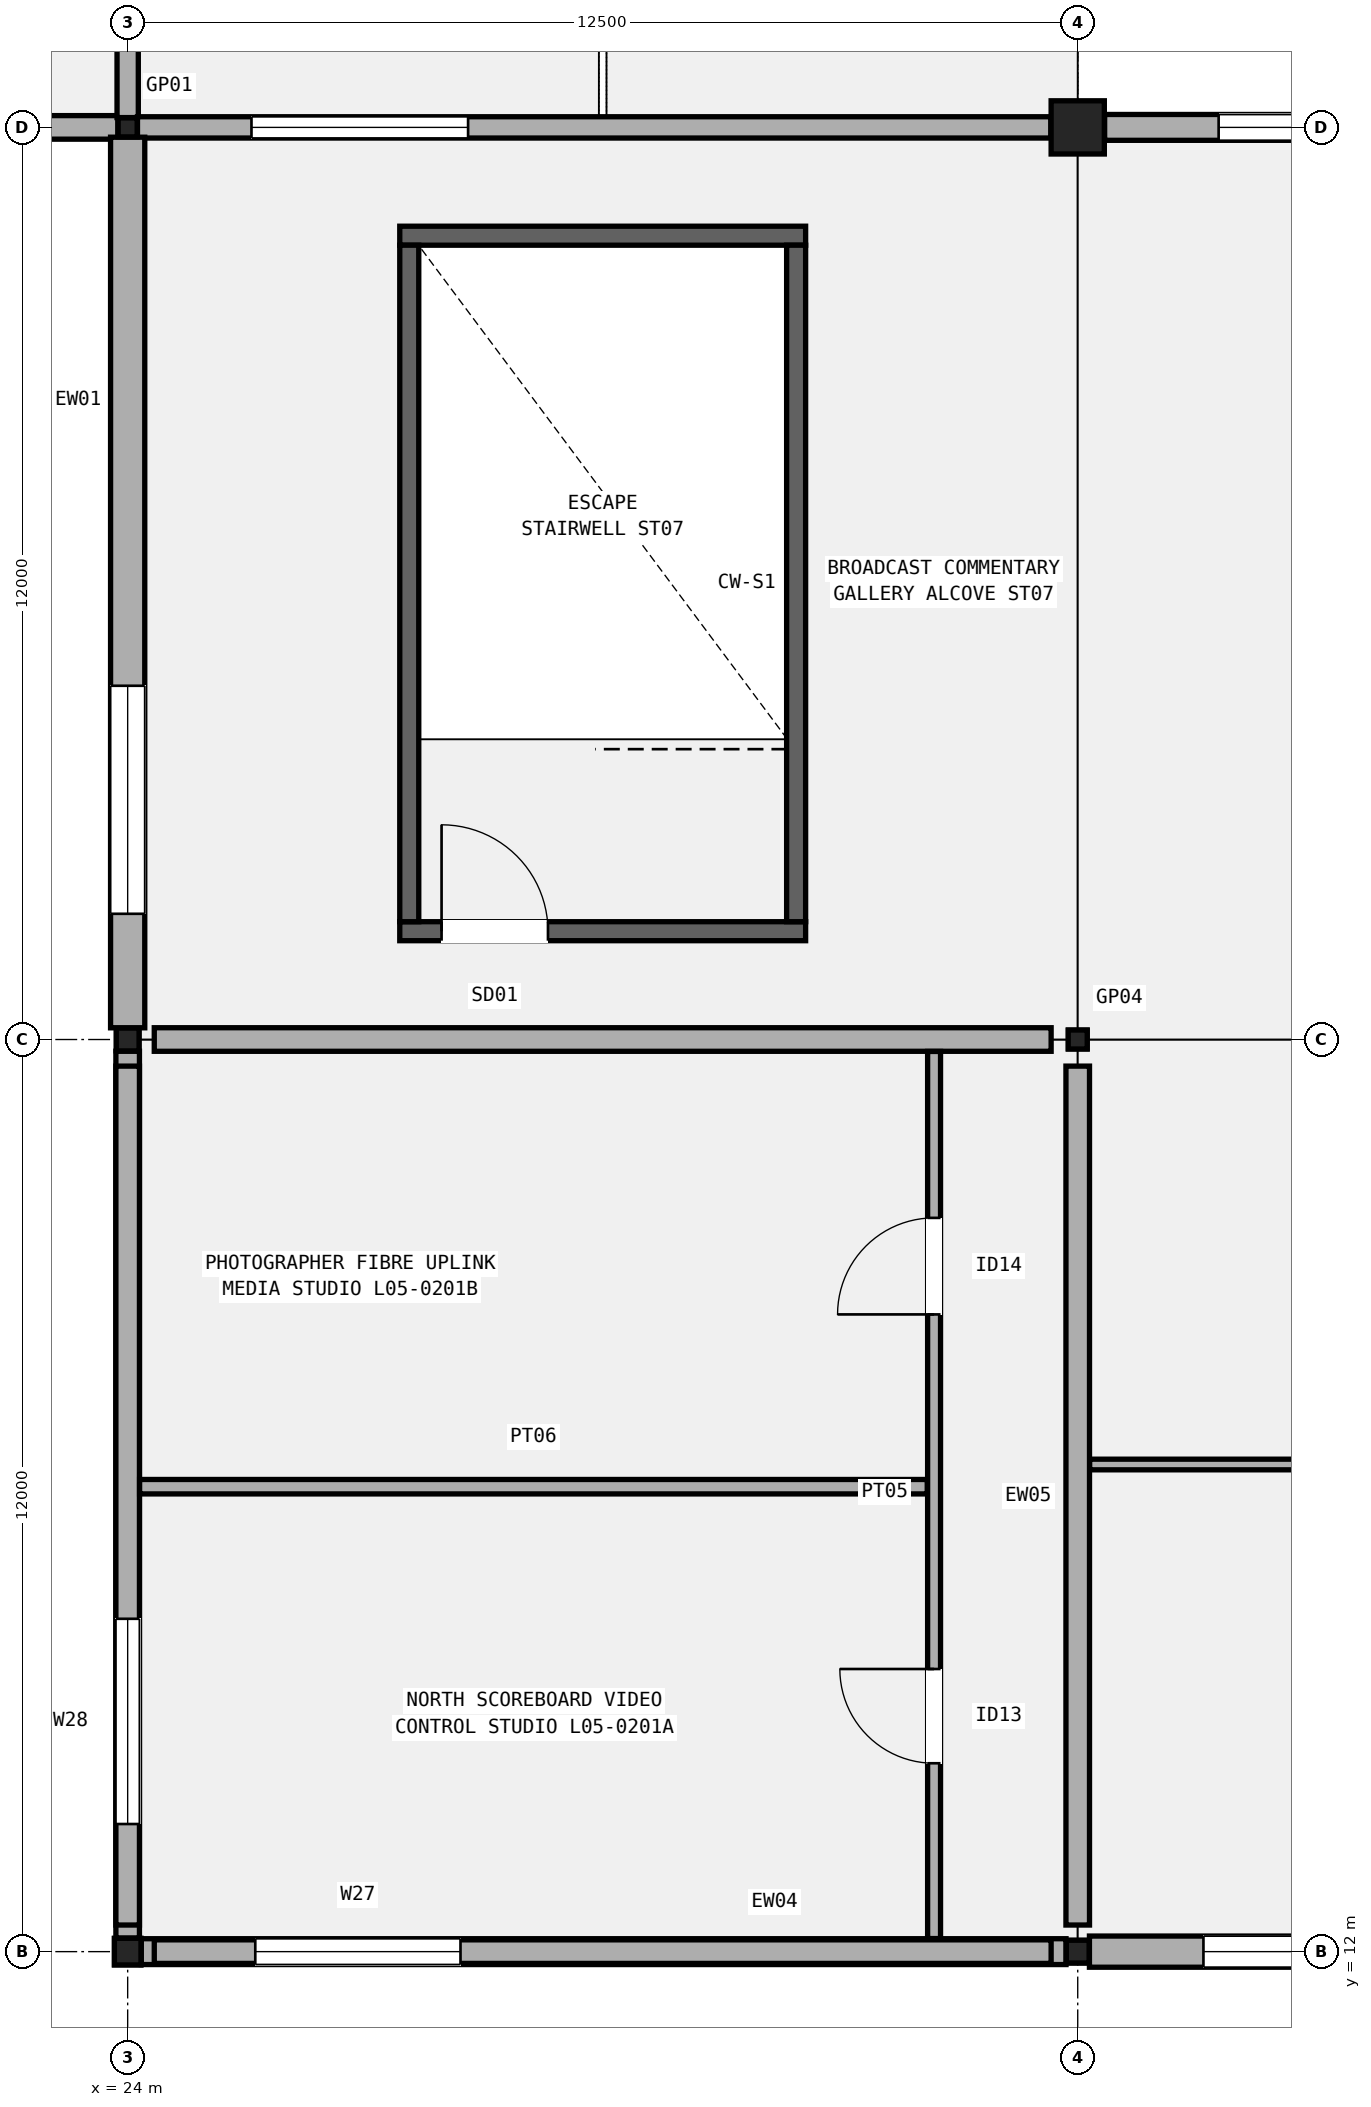
"""IFC4 building model, lengths in metres.
Left out: names, types, materials, properties, quantities, classifications, styles, units other than length and angle.
Written with IfcOpenShell. Run it as: python <this file> out.ifc"""

import sys

from ifc_helpers import new_model, si_unit, direction, frame, frame_2d, origin, origin_2d, place, context, subcontext, project, spatial, rectangle, hollow_rectangle, extrude, element, fill, save


model = new_model("IFC4")
c1 = context("Model", 3, precision=1e-05, world=origin(), true_north=direction((0.0, 1.0)))
c2 = subcontext(c1, "Body", "Model", "MODEL_VIEW")
j1 = project(units=[si_unit("LENGTHUNIT", "METRE"), si_unit("PLANEANGLEUNIT", "RADIAN")], contexts=[c1])
p1 = place(None, origin())
s1 = spatial("IfcSite", under=j1, at=p1, CompositionType="ELEMENT")
p2 = place(p1, origin())
s2 = spatial("IfcBuilding", under=s1, at=p2, CompositionType="ELEMENT")
p3 = place(p2, frame((0.0, 0.0, 25.8)))
s3 = spatial("IfcBuildingStorey", under=s2, at=p3, CompositionType="ELEMENT", Elevation=25.8)
p4 = place(p3, frame((24.0, 12.0, 0.0), z_axis=(0.0, 0.0, 1.0), x_axis=(1.0, 0.0, 0.0)))
e1 = element("IfcColumn", 1, at=p4, inside=s3, PredefinedType="COLUMN", context=c2, shape_type="SweptSolid", body=[
    extrude(hollow_rectangle(XDim=0.35, YDim=0.35, WallThickness=0.016, InnerFilletRadius=0.016, OuterFilletRadius=0.032, at=origin_2d()), origin(), (0.0, 0.0, 1.0), 5.4),
])
p5 = place(p3, frame((24.0, 24.0, 0.0), z_axis=(0.0, 0.0, 1.0), x_axis=(1.0, 0.0, 0.0)))
e2 = element("IfcColumn", 2, at=p5, inside=s3, PredefinedType="COLUMN", context=c2, shape_type="SweptSolid", body=[
    extrude(hollow_rectangle(XDim=0.3, YDim=0.3, WallThickness=0.012, InnerFilletRadius=0.012, OuterFilletRadius=0.024, at=origin_2d()), origin(), (0.0, 0.0, 1.0), 5.4),
])
p6 = place(p3, frame((24.0, 36.0, 0.0), z_axis=(0.0, 0.0, 1.0), x_axis=(1.0, 0.0, 0.0)))
e3 = element("IfcColumn", 3, at=p6, inside=s3, PredefinedType="COLUMN", context=c2, shape_type="SweptSolid", body=[
    extrude(hollow_rectangle(XDim=0.25, YDim=0.25, WallThickness=0.012, InnerFilletRadius=0.012, OuterFilletRadius=0.024, at=origin_2d()), origin(), (0.0, 0.0, 1.0), 5.4),
])
p7 = place(p3, frame((36.5, 12.0, 0.0), z_axis=(0.0, 0.0, 1.0), x_axis=(1.0, 0.0, 0.0)))
e4 = element("IfcColumn", 4, at=p7, inside=s3, PredefinedType="COLUMN", context=c2, shape_type="SweptSolid", body=[
    extrude(hollow_rectangle(XDim=0.3, YDim=0.3, WallThickness=0.012, InnerFilletRadius=0.012, OuterFilletRadius=0.024, at=origin_2d()), origin(), (0.0, 0.0, 1.0), 5.4),
])
p8 = place(p3, frame((36.5, 24.0, 0.0), z_axis=(0.0, 0.0, 1.0), x_axis=(1.0, 0.0, 0.0)))
e5 = element("IfcColumn", 5, at=p8, inside=s3, PredefinedType="COLUMN", context=c2, shape_type="SweptSolid", body=[
    extrude(hollow_rectangle(XDim=0.25, YDim=0.25, WallThickness=0.012, InnerFilletRadius=0.012, OuterFilletRadius=0.024, at=origin_2d()), origin(), (0.0, 0.0, 1.0), 5.4),
])
p9 = place(p3, frame((36.5, 36.0, 0.0), z_axis=(0.0, 0.0, 1.0), x_axis=(1.0, 0.0, 0.0)))
e6 = element("IfcColumn", 6, at=p9, inside=s3, PredefinedType="COLUMN", context=c2, shape_type="SweptSolid", body=[
    extrude(rectangle(XDim=0.7, YDim=0.7, at=origin_2d()), origin(), (0.0, 0.0, 1.0), 5.4),
])
p10 = place(p3, frame((12.154, 36.0, 0.0), z_axis=(0.0, 0.0, 1.0), x_axis=(1.0, 0.0, 0.0)))
e7 = element("IfcWall", 7, at=p10, inside=s3, PredefinedType="SOLIDWALL", context=c2, shape_type="SweptSolid", body=[
    extrude(rectangle(XDim=11.717, YDim=0.31, at=frame_2d((5.858, 0.0))), origin(), (0.0, 0.0, 1.0), 4.44),
])
p11 = place(p10, frame((1.5, 0.0, 0.95)))
e8 = element("IfcOpeningElement", 8, at=p11, cuts=e7, PredefinedType="OPENING", context=c2, shape_type="SweptSolid", body=[
    extrude(rectangle(XDim=1.5, YDim=2.25, at=frame_2d((0.75, 1.125))), frame((0.0, 0.165, 0.0), z_axis=(0.0, -1.0, 0.0), x_axis=(1.0, 0.0, 0.0)), (0.0, 0.0, 1.0), 0.33),
])
p12 = place(p3, frame((24.0, 36.129, 0.0), z_axis=(0.0, 0.0, 1.0), x_axis=(0.0, 1.0, 0.0)))
e9 = element("IfcWall", 9, at=p12, inside=s3, PredefinedType="SOLIDWALL", context=c2, shape_type="SweptSolid", body=[
    extrude(rectangle(XDim=11.517, YDim=0.28, at=frame_2d((5.759, 0.0))), origin(), (0.0, 0.0, 1.0), 4.13),
])
p13 = place(p12, frame((1.5, 0.0, 0.95)))
e10 = element("IfcOpeningElement", 10, at=p13, cuts=e9, PredefinedType="OPENING", context=c2, shape_type="SweptSolid", body=[
    extrude(rectangle(XDim=1.65, YDim=2.05, at=frame_2d((0.825, 1.025))), frame((0.0, 0.15, 0.0), z_axis=(0.0, -1.0, 0.0), x_axis=(1.0, 0.0, 0.0)), (0.0, 0.0, 1.0), 0.3),
])
p14 = place(p3, frame((24.179, 12.0, 0.0), z_axis=(0.0, 0.0, 1.0), x_axis=(1.0, 0.0, 0.0)))
e11 = element("IfcWall", 11, at=p14, inside=s3, PredefinedType="SOLIDWALL", context=c2, shape_type="SweptSolid", body=[
    extrude(rectangle(XDim=12.167, YDim=0.34, at=frame_2d((6.083, 0.0))), origin(), (0.0, 0.0, 1.0), 4.34),
])
p15 = place(p14, frame((1.5, 0.0, 0.95)))
e12 = element("IfcOpeningElement", 12, at=p15, cuts=e11, PredefinedType="OPENING", context=c2, shape_type="SweptSolid", body=[
    extrude(rectangle(XDim=2.7, YDim=1.75, at=frame_2d((1.35, 0.875))), frame((0.0, 0.18, 0.0), z_axis=(0.0, -1.0, 0.0), x_axis=(1.0, 0.0, 0.0)), (0.0, 0.0, 1.0), 0.36),
])
p16 = place(p3, frame((24.0, 12.179, 0.0), z_axis=(0.0, 0.0, 1.0), x_axis=(0.0, 1.0, 0.0)))
e13 = element("IfcWall", 13, at=p16, inside=s3, PredefinedType="SOLIDWALL", context=c2, shape_type="SweptSolid", body=[
    extrude(rectangle(XDim=11.667, YDim=0.31, at=frame_2d((5.833, 0.0))), origin(), (0.0, 0.0, 1.0), 4.34),
])
p17 = place(p16, frame((1.5, 0.0, 0.95)))
e14 = element("IfcOpeningElement", 14, at=p17, cuts=e13, PredefinedType="OPENING", context=c2, shape_type="SweptSolid", body=[
    extrude(rectangle(XDim=2.7, YDim=2.2, at=frame_2d((1.35, 1.1))), frame((0.0, 0.165, 0.0), z_axis=(0.0, -1.0, 0.0), x_axis=(1.0, 0.0, 0.0)), (0.0, 0.0, 1.0), 0.33),
])
p18 = place(p3, frame((24.129, 36.0, 0.0), z_axis=(0.0, 0.0, 1.0), x_axis=(1.0, 0.0, 0.0)))
e15 = element("IfcWall", 15, at=p18, inside=s3, PredefinedType="SOLIDWALL", context=c2, shape_type="SweptSolid", body=[
    extrude(rectangle(XDim=12.017, YDim=0.28, at=frame_2d((6.009, 0.0))), origin(), (0.0, 0.0, 1.0), 4.452),
])
p19 = place(p18, frame((1.5, 0.0, 0.95)))
e16 = element("IfcOpeningElement", 16, at=p19, cuts=e15, PredefinedType="OPENING", context=c2, shape_type="SweptSolid", body=[
    extrude(rectangle(XDim=2.85, YDim=2.0, at=frame_2d((1.425, 1.0))), frame((0.0, 0.15, 0.0), z_axis=(0.0, -1.0, 0.0), x_axis=(1.0, 0.0, 0.0)), (0.0, 0.0, 1.0), 0.3),
])
p20 = place(p3, frame((24.0, 24.154, 0.0), z_axis=(0.0, 0.0, 1.0), x_axis=(0.0, 1.0, 0.0)))
e17 = element("IfcWall", 17, at=p20, inside=s3, PredefinedType="SOLIDWALL", context=c2, shape_type="SweptSolid", body=[
    extrude(rectangle(XDim=11.717, YDim=0.45, at=frame_2d((5.858, 0.0))), origin(), (0.0, 0.0, 1.0), 4.44),
])
p21 = place(p20, frame((1.5, 0.0, 0.95)))
e18 = element("IfcOpeningElement", 18, at=p21, cuts=e17, PredefinedType="OPENING", context=c2, shape_type="SweptSolid", body=[
    extrude(rectangle(XDim=3.0, YDim=1.7, at=frame_2d((1.5, 0.85))), frame((0.0, 0.235, 0.0), z_axis=(0.0, -1.0, 0.0), x_axis=(1.0, 0.0, 0.0)), (0.0, 0.0, 1.0), 0.47),
])
p22 = place(p3, frame((36.654, 12.0, 0.0), z_axis=(0.0, 0.0, 1.0), x_axis=(1.0, 0.0, 0.0)))
e19 = element("IfcWall", 19, at=p22, inside=s3, PredefinedType="SOLIDWALL", context=c2, shape_type="SweptSolid", body=[
    extrude(rectangle(XDim=12.217, YDim=0.41, at=frame_2d((6.108, 0.0))), origin(), (0.0, 0.0, 1.0), 4.44),
])
p23 = place(p22, frame((1.5, 0.0, 0.95)))
e20 = element("IfcOpeningElement", 20, at=p23, cuts=e19, PredefinedType="OPENING", context=c2, shape_type="SweptSolid", body=[
    extrude(rectangle(XDim=3.0, YDim=2.15, at=frame_2d((1.5, 1.075))), frame((0.0, 0.215, 0.0), z_axis=(0.0, -1.0, 0.0), x_axis=(1.0, 0.0, 0.0)), (0.0, 0.0, 1.0), 0.43),
])
p24 = place(p3, frame((36.854, 36.0, 0.0), z_axis=(0.0, 0.0, 1.0), x_axis=(1.0, 0.0, 0.0)))
e21 = element("IfcWall", 21, at=p24, inside=s3, PredefinedType="SOLIDWALL", context=c2, shape_type="SweptSolid", body=[
    extrude(rectangle(XDim=11.842, YDim=0.34, at=frame_2d((5.921, 0.0))), origin(), (0.0, 0.0, 1.0), 4.13),
])
p25 = place(p24, frame((1.5, 0.0, 0.95)))
e22 = element("IfcOpeningElement", 22, at=p25, cuts=e21, PredefinedType="OPENING", context=c2, shape_type="SweptSolid", body=[
    extrude(rectangle(XDim=3.3, YDim=1.8, at=frame_2d((1.65, 0.9))), frame((0.0, 0.18, 0.0), z_axis=(0.0, -1.0, 0.0), x_axis=(1.0, 0.0, 0.0)), (0.0, 0.0, 1.0), 0.36),
])
p26 = place(p3, frame((24.35, 12.0, 5.4), z_axis=(0.0, 0.0, 1.0), x_axis=(1.0, 0.0, 0.0)))
e23 = element("IfcWall", 23, at=p26, inside=s3, PredefinedType="SOLIDWALL", context=c2, shape_type="SweptSolid", body=[
    extrude(rectangle(XDim=11.8, YDim=0.31, at=frame_2d((5.9, 0.0))), origin(), (0.0, 0.0, 1.0), 1.38),
])
p27 = place(p3, frame((24.35, 24.0, 5.4), z_axis=(0.0, 0.0, 1.0), x_axis=(1.0, 0.0, 0.0)))
e24 = element("IfcWall", 24, at=p27, inside=s3, PredefinedType="SOLIDWALL", context=c2, shape_type="SweptSolid", body=[
    extrude(rectangle(XDim=11.8, YDim=0.31, at=frame_2d((5.9, 0.0))), origin(), (0.0, 0.0, 1.0), 0.58),
])
p28 = place(p3, frame((24.0, 12.35, 5.4), z_axis=(0.0, 0.0, 1.0), x_axis=(0.0, 1.0, 0.0)))
e25 = element("IfcWall", 25, at=p28, inside=s3, PredefinedType="SOLIDWALL", context=c2, shape_type="SweptSolid", body=[
    extrude(rectangle(XDim=11.3, YDim=0.31, at=frame_2d((5.65, 0.0))), origin(), (0.0, 0.0, 1.0), 1.38),
])
p29 = place(p3, frame((36.5, 12.35, 5.4), z_axis=(0.0, 0.0, 1.0), x_axis=(0.0, 1.0, 0.0)))
e26 = element("IfcWall", 26, at=p29, inside=s3, PredefinedType="SOLIDWALL", context=c2, shape_type="SweptSolid", body=[
    extrude(rectangle(XDim=11.3, YDim=0.31, at=frame_2d((5.65, 0.0))), origin(), (0.0, 0.0, 1.0), 0.58),
])
p30 = place(p3, frame((27.58, 25.425, 0.0), z_axis=(0.0, 0.0, 1.0), x_axis=(1.0, 0.0, 0.0)))
e27 = element("IfcWall", 27, at=p30, inside=s3, PredefinedType="SHEAR", context=c2, shape_type="SweptSolid", body=[
    extrude(rectangle(XDim=5.34, YDim=0.25, at=frame_2d((2.67, 0.0))), origin(), (0.0, 0.0, 1.0), 5.04),
])
p31 = place(p30, frame((0.55, 0.0, 0.0)))
e28 = element("IfcOpeningElement", 28, at=p31, cuts=e27, PredefinedType="OPENING", context=c2, shape_type="SweptSolid", body=[
    extrude(rectangle(XDim=1.4, YDim=2.15, at=frame_2d((0.7, 1.075))), frame((0.0, 0.135, 0.0), z_axis=(0.0, -1.0, 0.0), x_axis=(1.0, 0.0, 0.0)), (0.0, 0.0, 1.0), 0.27),
])
p32 = place(p3, frame((27.58, 34.575, 0.0), z_axis=(0.0, 0.0, 1.0), x_axis=(1.0, 0.0, 0.0)))
e29 = element("IfcWall", 29, at=p32, inside=s3, PredefinedType="SHEAR", context=c2, shape_type="SweptSolid", body=[
    extrude(rectangle(XDim=5.34, YDim=0.25, at=frame_2d((2.67, 0.0))), origin(), (0.0, 0.0, 1.0), 5.04),
])
for number, where, z_axis, x_axis in (
    (30, (27.705, 25.55, 0.0), (0.0, 0.0, 1.0), (0.0, 1.0, 0.0)),
    (31, (32.795, 25.55, 0.0), (0.0, 0.0, 1.0), (0.0, 1.0, 0.0)),
):
    element("IfcWall", number, at=place(p3, frame(where, z_axis=z_axis, x_axis=x_axis)), inside=s3, PredefinedType="SHEAR", context=c2, shape_type="SweptSolid", body=[
        extrude(rectangle(XDim=8.9, YDim=0.25, at=frame_2d((4.45, 0.0))), origin(), (0.0, 0.0, 1.0), 5.04),
    ])
p33 = place(p3, frame((34.61, 12.172, 0.0), z_axis=(0.0, 0.0, 1.0), x_axis=(0.0, 1.0, 0.0)))
e32 = element("IfcWall", 32, at=p33, inside=s3, PredefinedType="PARTITIONING", context=c2, shape_type="SweptSolid", body=[
    extrude(rectangle(XDim=11.671, YDim=0.17, at=frame_2d((5.835, 0.0))), origin(), (0.0, 0.0, 1.0), 4.35),
])
p34 = place(p33, frame((2.306, 0.0, 0.0)))
e33 = element("IfcOpeningElement", 33, at=p34, cuts=e32, PredefinedType="OPENING", context=c2, shape_type="SweptSolid", body=[
    extrude(rectangle(XDim=1.24, YDim=2.22, at=frame_2d((0.62, 1.11))), frame((0.0, 0.095, 0.0), z_axis=(0.0, -1.0, 0.0), x_axis=(1.0, 0.0, 0.0)), (0.0, 0.0, 1.0), 0.19),
])
p35 = place(p33, frame((8.211, 0.0, 0.0)))
e34 = element("IfcOpeningElement", 34, at=p35, cuts=e32, PredefinedType="OPENING", context=c2, shape_type="SweptSolid", body=[
    extrude(rectangle(XDim=1.27, YDim=2.2, at=frame_2d((0.635, 1.1))), frame((0.0, 0.095, 0.0), z_axis=(0.0, -1.0, 0.0), x_axis=(1.0, 0.0, 0.0)), (0.0, 0.0, 1.0), 0.19),
])
p36 = place(p3, frame((24.157, 18.117, 0.0), z_axis=(0.0, 0.0, 1.0), x_axis=(1.0, 0.0, 0.0)))
e35 = element("IfcWall", 35, at=p36, inside=s3, PredefinedType="PARTITIONING", context=c2, shape_type="SweptSolid", body=[
    extrude(rectangle(XDim=10.363, YDim=0.19, at=frame_2d((5.182, 0.0))), origin(), (0.0, 0.0, 1.0), 4.35),
])
p37 = place(p3, frame((36.657, 18.409, 0.0), z_axis=(0.0, 0.0, 1.0), x_axis=(1.0, 0.0, 0.0)))
e36 = element("IfcWall", 36, at=p37, inside=s3, PredefinedType="PARTITIONING", context=c2, shape_type="SweptSolid", body=[
    extrude(rectangle(XDim=10.388, YDim=0.14, at=frame_2d((5.194, 0.0))), origin(), (0.0, 0.0, 1.0), 4.35),
])
p38 = place(p15, origin())
e37 = element("IfcWindow", 37, at=p38, inside=s3, PartitioningType="SINGLE_PANEL", PredefinedType="WINDOW", context=c2, shape_type="SweptSolid", body=[
    extrude(rectangle(XDim=2.7, YDim=1.75, at=frame_2d((1.35, 0.875))), frame((0.0, 0.03, 0.0), z_axis=(0.0, -1.0, 0.0), x_axis=(1.0, 0.0, 0.0)), (0.0, 0.0, 1.0), 0.06),
])
fill(e12, e37)
p39 = place(p17, origin())
e38 = element("IfcWindow", 38, at=p39, inside=s3, PartitioningType="SINGLE_PANEL", PredefinedType="WINDOW", context=c2, shape_type="SweptSolid", body=[
    extrude(rectangle(XDim=2.7, YDim=2.2, at=frame_2d((1.35, 1.1))), frame((0.0, 0.03, 0.0), z_axis=(0.0, -1.0, 0.0), x_axis=(1.0, 0.0, 0.0)), (0.0, 0.0, 1.0), 0.06),
])
fill(e14, e38)
p40 = place(p19, origin())
e39 = element("IfcWindow", 39, at=p40, inside=s3, PartitioningType="SINGLE_PANEL", PredefinedType="WINDOW", context=c2, shape_type="SweptSolid", body=[
    extrude(rectangle(XDim=2.85, YDim=2.0, at=frame_2d((1.425, 1.0))), frame((0.0, 0.03, 0.0), z_axis=(0.0, -1.0, 0.0), x_axis=(1.0, 0.0, 0.0)), (0.0, 0.0, 1.0), 0.06),
])
fill(e16, e39)
p41 = place(p21, origin())
e40 = element("IfcWindow", 40, at=p41, inside=s3, PartitioningType="SINGLE_PANEL", PredefinedType="WINDOW", context=c2, shape_type="SweptSolid", body=[
    extrude(rectangle(XDim=3.0, YDim=1.7, at=frame_2d((1.5, 0.85))), frame((0.0, 0.03, 0.0), z_axis=(0.0, -1.0, 0.0), x_axis=(1.0, 0.0, 0.0)), (0.0, 0.0, 1.0), 0.06),
])
fill(e18, e40)
p42 = place(p23, origin())
e41 = element("IfcWindow", 41, at=p42, inside=s3, PartitioningType="SINGLE_PANEL", PredefinedType="WINDOW", context=c2, shape_type="SweptSolid", body=[
    extrude(rectangle(XDim=3.0, YDim=2.15, at=frame_2d((1.5, 1.075))), frame((0.0, 0.03, 0.0), z_axis=(0.0, -1.0, 0.0), x_axis=(1.0, 0.0, 0.0)), (0.0, 0.0, 1.0), 0.06),
])
fill(e20, e41)
p43 = place(p25, origin())
e42 = element("IfcWindow", 42, at=p43, inside=s3, PartitioningType="SINGLE_PANEL", PredefinedType="WINDOW", context=c2, shape_type="SweptSolid", body=[
    extrude(rectangle(XDim=3.3, YDim=1.8, at=frame_2d((1.65, 0.9))), frame((0.0, 0.03, 0.0), z_axis=(0.0, -1.0, 0.0), x_axis=(1.0, 0.0, 0.0)), (0.0, 0.0, 1.0), 0.06),
])
fill(e22, e42)
p44 = place(p31, origin())
e43 = element("IfcDoor", 43, at=p44, inside=s3, OperationType="SINGLE_SWING_LEFT", PredefinedType="DOOR", context=c2, shape_type="SweptSolid", body=[
    extrude(rectangle(XDim=1.4, YDim=2.15, at=frame_2d((0.7, 1.075))), frame((0.0, 0.025, 0.0), z_axis=(0.0, -1.0, 0.0), x_axis=(1.0, 0.0, 0.0)), (0.0, 0.0, 1.0), 0.05),
])
fill(e28, e43)
p45 = place(p34, origin())
e44 = element("IfcDoor", 44, at=p45, inside=s3, OperationType="SINGLE_SWING_RIGHT", PredefinedType="DOOR", context=c2, shape_type="SweptSolid", body=[
    extrude(rectangle(XDim=1.24, YDim=2.22, at=frame_2d((0.62, 1.11))), frame((0.0, 0.025, 0.0), z_axis=(0.0, -1.0, 0.0), x_axis=(1.0, 0.0, 0.0)), (0.0, 0.0, 1.0), 0.05),
])
fill(e33, e44)
p46 = place(p35, origin())
e45 = element("IfcDoor", 45, at=p46, inside=s3, OperationType="SINGLE_SWING_LEFT", PredefinedType="DOOR", context=c2, shape_type="SweptSolid", body=[
    extrude(rectangle(XDim=1.27, YDim=2.2, at=frame_2d((0.635, 1.1))), frame((0.0, 0.025, 0.0), z_axis=(0.0, -1.0, 0.0), x_axis=(1.0, 0.0, 0.0)), (0.0, 0.0, 1.0), 0.05),
])
fill(e34, e45)
save(model, sys.argv[1])
